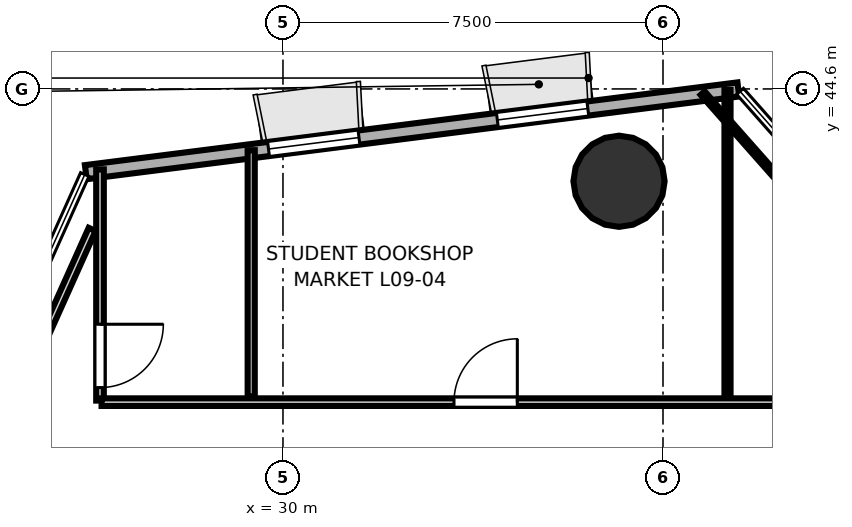
"""IFC4 building model, lengths in metres.
Left out: names, types, materials, properties, quantities, classifications, styles, units other than length and angle.
Written with IfcOpenShell. Run it as: python <this file> out.ifc"""

import sys

from ifc_helpers import new_model, si_unit, direction, frame, frame_2d, origin, origin_2d, place, context, subcontext, project, spatial, rectangle, hollow_circle, extrude, element, fill, save


model = new_model("IFC4")
c1 = context("Model", 3, precision=1e-05, world=origin(), true_north=direction((0.0, 1.0)))
c2 = subcontext(c1, "Body", "Model", "MODEL_VIEW")
j1 = project(units=[si_unit("LENGTHUNIT", "METRE"), si_unit("PLANEANGLEUNIT", "RADIAN")], contexts=[c1])
p1 = place(None, origin())
s1 = spatial("IfcSite", under=j1, at=p1, CompositionType="ELEMENT")
p2 = place(p1, origin())
s2 = spatial("IfcBuilding", under=s1, at=p2, CompositionType="ELEMENT")
p3 = place(p2, frame((0.0, 0.0, 40.5)))
s3 = spatial("IfcBuildingStorey", under=s2, at=p3, CompositionType="ELEMENT", Elevation=40.5)
p4 = place(p3, frame((36.632, 42.778, 0.0), z_axis=(0.0, 0.0, 1.0), x_axis=(1.0, 0.0, 0.0)))
e1 = element("IfcColumn", 1, at=p4, inside=s3, PredefinedType="COLUMN", context=c2, shape_type="SweptSolid", body=[
    extrude(hollow_circle(Radius=0.9, WallThickness=0.045, at=origin_2d()), origin(), (0.0, 0.0, 1.0), 3.7),
])
p5 = place(p3, frame((38.987, 44.59, 0.0), z_axis=(0.0, 0.0, 1.0), x_axis=(-0.992057885568, -0.125782159637, 0.0)))
e2 = element("IfcWall", 2, at=p5, inside=s3, PredefinedType="SOLIDWALL", context=c2, shape_type="SweptSolid", body=[
    extrude(rectangle(XDim=12.981, YDim=0.28, at=frame_2d((6.491, 0.0))), origin(), (0.0, 0.0, 1.0), 3.52),
])
p6 = place(p5, frame((2.994, 0.0, 0.85)))
e3 = element("IfcOpeningElement", 3, at=p6, cuts=e2, PredefinedType="OPENING", context=c2, shape_type="SweptSolid", body=[
    extrude(rectangle(XDim=1.8, YDim=2.1, at=frame_2d((0.9, 1.05))), frame((0.0, 0.15, 0.0), z_axis=(0.0, -1.0, 0.0), x_axis=(1.0, 0.0, 0.0)), (0.0, 0.0, 1.0), 0.3),
])
p7 = place(p5, frame((7.547, 0.0, 0.85)))
e4 = element("IfcOpeningElement", 4, at=p7, cuts=e2, PredefinedType="OPENING", context=c2, shape_type="SweptSolid", body=[
    extrude(rectangle(XDim=1.8, YDim=2.1, at=frame_2d((0.9, 1.05))), frame((0.0, 0.15, 0.0), z_axis=(0.0, -1.0, 0.0), x_axis=(1.0, 0.0, 0.0)), (0.0, 0.0, 1.0), 0.3),
])
p8 = place(p3, frame((23.578, 35.909, 0.0), z_axis=(0.0, 0.0, 1.0), x_axis=(0.409253596505, 0.912420678058, 0.0)))
e5 = element("IfcWall", 5, at=p8, inside=s3, PredefinedType="PARTITIONING", context=c2, shape_type="SweptSolid", body=[
    extrude(rectangle(XDim=6.489, YDim=0.15, at=frame_2d((3.244, 0.0))), origin(), (0.0, 0.0, 1.0), 2.84),
])
p9 = place(p3, frame((26.389, 43.013, 0.0), z_axis=(0.0, 0.0, 1.0), x_axis=(0.0, -1.0, 0.0)))
e6 = element("IfcWall", 6, at=p9, inside=s3, PredefinedType="PARTITIONING", context=c2, shape_type="SweptSolid", body=[
    extrude(rectangle(XDim=4.563, YDim=0.15, at=frame_2d((2.281, 0.0))), origin(), (0.0, 0.0, 1.0), 2.84),
])
p10 = place(p9, frame((3.056, 0.0, 0.0)))
e7 = element("IfcOpeningElement", 7, at=p10, cuts=e6, PredefinedType="OPENING", context=c2, shape_type="SweptSolid", body=[
    extrude(rectangle(XDim=1.25, YDim=2.2, at=frame_2d((0.625, 1.1))), frame((0.0, 0.085, 0.0), z_axis=(0.0, -1.0, 0.0), x_axis=(1.0, 0.0, 0.0)), (0.0, 0.0, 1.0), 0.17),
])
p11 = place(p3, frame((26.42, 38.419, 0.0), z_axis=(0.0, 0.0, 1.0), x_axis=(1.0, 0.0, 0.0)))
e8 = element("IfcWall", 8, at=p11, inside=s3, PredefinedType="PARTITIONING", context=c2, shape_type="SweptSolid", body=[
    extrude(rectangle(XDim=15.783, YDim=0.15, at=frame_2d((7.892, 0.0))), origin(), (0.0, 0.0, 1.0), 2.798),
])
p12 = place(p11, frame((6.955, 0.0, 0.0)))
e9 = element("IfcOpeningElement", 9, at=p12, cuts=e8, PredefinedType="OPENING", context=c2, shape_type="SweptSolid", body=[
    extrude(rectangle(XDim=1.25, YDim=2.2, at=frame_2d((0.625, 1.1))), frame((0.0, 0.085, 0.0), z_axis=(0.0, -1.0, 0.0), x_axis=(1.0, 0.0, 0.0)), (0.0, 0.0, 1.0), 0.17),
])
p13 = place(p3, frame((38.773, 38.53, 0.0), z_axis=(0.0, 0.0, 1.0), x_axis=(0.0, 1.0, 0.0)))
e10 = element("IfcWall", 10, at=p13, inside=s3, PredefinedType="PARTITIONING", context=c2, shape_type="SweptSolid", body=[
    extrude(rectangle(XDim=6.053, YDim=0.12, at=frame_2d((3.026, 0.0))), origin(), (0.0, 0.0, 1.0), 2.798),
])
p14 = place(p3, frame((38.282, 44.518, 0.0), z_axis=(0.0, 0.0, 1.0), x_axis=(0.66245043497, -0.74910574768, 0.0)))
e11 = element("IfcWall", 11, at=p14, inside=s3, PredefinedType="PARTITIONING", context=c2, shape_type="SweptSolid", body=[
    extrude(rectangle(XDim=31.025, YDim=0.105, at=frame_2d((15.512, 0.0))), origin(), (0.0, 0.0, 1.0), 2.798),
])
p15 = place(p3, frame((29.373, 38.53, 0.0), z_axis=(0.0, 0.0, 1.0), x_axis=(0.0, 1.0, 0.0)))
e12 = element("IfcWall", 12, at=p15, inside=s3, PredefinedType="PARTITIONING", context=c2, shape_type="SweptSolid", body=[
    extrude(rectangle(XDim=4.861, YDim=0.14, at=frame_2d((2.431, 0.0))), origin(), (0.0, 0.0, 1.0), 2.84),
])
p16 = place(p12, origin())
e13 = element("IfcDoor", 13, at=p16, inside=s3, OperationType="SINGLE_SWING_RIGHT", PredefinedType="DOOR", context=c2, shape_type="SweptSolid", body=[
    extrude(rectangle(XDim=1.25, YDim=2.2, at=frame_2d((0.625, 1.1))), frame((0.0, 0.025, 0.0), z_axis=(0.0, -1.0, 0.0), x_axis=(1.0, 0.0, 0.0)), (0.0, 0.0, 1.0), 0.05),
])
fill(e9, e13)
p17 = place(p10, origin())
e14 = element("IfcDoor", 14, at=p17, inside=s3, OperationType="SINGLE_SWING_LEFT", PredefinedType="DOOR", context=c2, shape_type="SweptSolid", body=[
    extrude(rectangle(XDim=1.25, YDim=2.2, at=frame_2d((0.625, 1.1))), frame((0.0, 0.025, 0.0), z_axis=(0.0, -1.0, 0.0), x_axis=(1.0, 0.0, 0.0)), (0.0, 0.0, 1.0), 0.05),
])
fill(e7, e14)
p18 = place(p6, origin())
e15 = element("IfcWindow", 15, at=p18, inside=s3, PartitioningType="SINGLE_PANEL", PredefinedType="WINDOW", context=c2, shape_type="SweptSolid", body=[
    extrude(rectangle(XDim=1.8, YDim=2.1, at=frame_2d((0.9, 1.05))), frame((0.0, 0.03, 0.0), z_axis=(0.0, -1.0, 0.0), x_axis=(1.0, 0.0, 0.0)), (0.0, 0.0, 1.0), 0.06),
])
fill(e3, e15)
p19 = place(p7, origin())
e16 = element("IfcWindow", 16, at=p19, inside=s3, PartitioningType="SINGLE_PANEL", PredefinedType="WINDOW", context=c2, shape_type="SweptSolid", body=[
    extrude(rectangle(XDim=1.8, YDim=2.1, at=frame_2d((0.9, 1.05))), frame((0.0, 0.03, 0.0), z_axis=(0.0, -1.0, 0.0), x_axis=(1.0, 0.0, 0.0)), (0.0, 0.0, 1.0), 0.06),
])
fill(e4, e16)
save(model, sys.argv[1])
